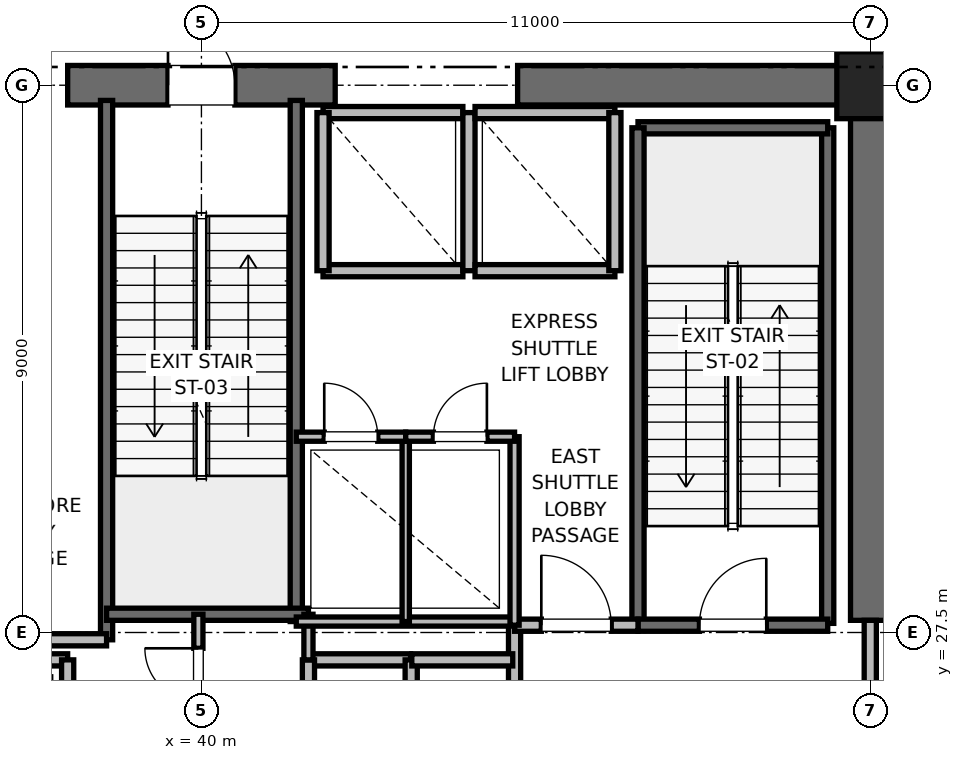
"""IFC4 building model, lengths in metres.
Left out: names, types, materials, properties, quantities, classifications, styles, units other than length and angle.
Written with IfcOpenShell. Run it as: python <this file> out.ifc"""

import sys

from ifc_helpers import new_model, si_unit, direction, frame, frame_2d, origin, origin_2d, place, context, subcontext, project, spatial, rectangle, extrude, element, fill, save


model = new_model("IFC4")
c1 = context("Model", 3, precision=1e-05, world=origin(), true_north=direction((0.0, 1.0)))
c2 = subcontext(c1, "Body", "Model", "MODEL_VIEW")
j1 = project(units=[si_unit("LENGTHUNIT", "METRE"), si_unit("PLANEANGLEUNIT", "RADIAN")], contexts=[c1])
p1 = place(None, origin())
s1 = spatial("IfcSite", under=j1, at=p1, CompositionType="ELEMENT")
p2 = place(p1, origin())
s2 = spatial("IfcBuilding", under=s1, at=p2, CompositionType="ELEMENT")
p3 = place(p2, frame((0.0, 0.0, 113.0)))
s3 = spatial("IfcBuildingStorey", under=s2, at=p3, CompositionType="ELEMENT", Elevation=113.0)
p4 = place(p3, frame((51.0, 36.5, 0.0), z_axis=(0.0, 0.0, 1.0), x_axis=(1.0, 0.0, 0.0)))
e1 = element("IfcColumn", 1, at=p4, inside=s3, PredefinedType="PILASTER", context=c2, shape_type="SweptSolid", body=[
    extrude(rectangle(XDim=1.1, YDim=1.1, at=origin_2d()), origin(), (0.0, 0.0, 1.0), 5.4),
])
p5 = place(p3, frame((37.8, 36.5, 0.0), z_axis=(0.0, 0.0, 1.0), x_axis=(1.0, 0.0, 0.0)))
e2 = element("IfcWall", 2, at=p5, inside=s3, PredefinedType="SHEAR", context=c2, shape_type="SweptSolid", body=[
    extrude(rectangle(XDim=4.4, YDim=0.65, at=frame_2d((2.2, 0.0))), origin(), (0.0, 0.0, 1.0), 5.1),
])
p6 = place(p5, frame((1.65, 0.0, 0.0)))
e3 = element("IfcOpeningElement", 3, at=p6, cuts=e2, PredefinedType="OPENING", context=c2, shape_type="SweptSolid", body=[
    extrude(rectangle(XDim=1.1, YDim=2.15, at=frame_2d((0.55, 1.075))), frame((0.0, 0.325, 0.0), z_axis=(0.0, -1.0, 0.0), x_axis=(1.0, 0.0, 0.0)), (0.0, 0.0, 1.0), 0.65),
])
p7 = place(p3, frame((45.2, 36.5, 0.0), z_axis=(0.0, 0.0, 1.0), x_axis=(1.0, 0.0, 0.0)))
e4 = element("IfcWall", 4, at=p7, inside=s3, PredefinedType="SHEAR", context=c2, shape_type="SweptSolid", body=[
    extrude(rectangle(XDim=5.8, YDim=0.65, at=frame_2d((2.9, 0.0))), origin(), (0.0, 0.0, 1.0), 5.1),
])
p8 = place(p3, frame((51.0, 27.7, 0.0), z_axis=(0.0, 0.0, 1.0), x_axis=(0.0, 1.0, 0.0)))
e5 = element("IfcWall", 5, at=p8, inside=s3, PredefinedType="SHEAR", context=c2, shape_type="SweptSolid", body=[
    extrude(rectangle(XDim=8.8, YDim=0.65, at=frame_2d((4.4, 0.0))), origin(), (0.0, 0.0, 1.0), 5.1),
])
p9 = place(p3, frame((50.3, 27.65, 0.0), z_axis=(0.0, 0.0, 1.0), x_axis=(0.0, 1.0, 0.0)))
e6 = element("IfcWall", 6, at=p9, inside=s3, PredefinedType="SOLIDWALL", context=c2, shape_type="SweptSolid", body=[
    extrude(rectangle(XDim=8.15, YDim=0.2, at=frame_2d((4.075, 0.0))), origin(), (0.0, 0.0, 1.0), 5.1),
])
p10 = place(p3, frame((47.18, 35.8, 0.0), z_axis=(0.0, 0.0, 1.0), x_axis=(1.0, 0.0, 0.0)))
e7 = element("IfcWall", 7, at=p10, inside=s3, PredefinedType="SOLIDWALL", context=c2, shape_type="SweptSolid", body=[
    extrude(rectangle(XDim=3.12, YDim=0.2, at=frame_2d((1.56, 0.0))), origin(), (0.0, 0.0, 1.0), 5.1),
])
p11 = place(p3, frame((47.18, 27.62, 0.0), z_axis=(0.0, 0.0, 1.0), x_axis=(0.0, 1.0, 0.0)))
e8 = element("IfcWall", 8, at=p11, inside=s3, PredefinedType="SOLIDWALL", context=c2, shape_type="SweptSolid", body=[
    extrude(rectangle(XDim=8.18, YDim=0.2, at=frame_2d((4.09, 0.0))), origin(), (0.0, 0.0, 1.0), 5.1),
])
p12 = place(p3, frame((47.18, 27.62, 0.0), z_axis=(0.0, 0.0, 1.0), x_axis=(1.0, 0.0, 0.0)))
e9 = element("IfcWall", 9, at=p12, inside=s3, PredefinedType="SOLIDWALL", context=c2, shape_type="SweptSolid", body=[
    extrude(rectangle(XDim=3.12, YDim=0.2, at=frame_2d((1.56, 0.0))), origin(), (0.0, 0.0, 1.0), 5.1),
])
p13 = place(p12, frame((1.01, 0.0, 0.0)))
e10 = element("IfcOpeningElement", 10, at=p13, cuts=e9, PredefinedType="OPENING", context=c2, shape_type="SweptSolid", body=[
    extrude(rectangle(XDim=1.1, YDim=2.15, at=frame_2d((0.55, 1.075))), frame((0.0, 0.1, 0.0), z_axis=(0.0, -1.0, 0.0), x_axis=(1.0, 0.0, 0.0)), (0.0, 0.0, 1.0), 0.2),
])
p14 = place(p3, frame((38.44, 27.38, 0.0), z_axis=(0.0, 0.0, 1.0), x_axis=(0.0, 1.0, 0.0)))
e11 = element("IfcWall", 11, at=p14, inside=s3, PredefinedType="SOLIDWALL", context=c2, shape_type="SweptSolid", body=[
    extrude(rectangle(XDim=8.87, YDim=0.2, at=frame_2d((4.435, 0.0))), origin(), (0.0, 0.0, 1.0), 5.1),
])
p15 = place(p3, frame((41.56, 27.68, 0.0), z_axis=(0.0, 0.0, 1.0), x_axis=(0.0, 1.0, 0.0)))
e12 = element("IfcWall", 12, at=p15, inside=s3, PredefinedType="SOLIDWALL", context=c2, shape_type="SweptSolid", body=[
    extrude(rectangle(XDim=8.57, YDim=0.2, at=frame_2d((4.285, 0.0))), origin(), (0.0, 0.0, 1.0), 5.1),
])
p16 = place(p3, frame((38.44, 27.8, 0.0), z_axis=(0.0, 0.0, 1.0), x_axis=(1.0, 0.0, 0.0)))
e13 = element("IfcWall", 13, at=p16, inside=s3, PredefinedType="SOLIDWALL", context=c2, shape_type="SweptSolid", body=[
    extrude(rectangle(XDim=3.32, YDim=0.2, at=frame_2d((1.66, 0.0))), origin(), (0.0, 0.0, 1.0), 5.1),
])
p17 = place(p3, frame((32.82, 27.38, 0.0), z_axis=(0.0, 0.0, 1.0), x_axis=(1.0, 0.0, 0.0)))
e14 = element("IfcWall", 14, at=p17, inside=s3, PredefinedType="PARTITIONING", context=c2, shape_type="SweptSolid", body=[
    extrude(rectangle(XDim=5.62, YDim=0.2, at=frame_2d((2.81, 0.0))), origin(), (0.0, 0.0, 1.0), 5.1),
])
p18 = place(p3, frame((45.15, 24.25, 0.0), z_axis=(0.0, 0.0, 1.0), x_axis=(0.0, 1.0, 0.0)))
e15 = element("IfcWall", 15, at=p18, inside=s3, PredefinedType="PARTITIONING", context=c2, shape_type="SweptSolid", body=[
    extrude(rectangle(XDim=3.37, YDim=0.2, at=frame_2d((1.685, 0.0))), origin(), (0.0, 0.0, 1.0), 5.1),
])
p19 = place(p3, frame((45.15, 27.62, 0.0), z_axis=(0.0, 0.0, 1.0), x_axis=(1.0, 0.0, 0.0)))
e16 = element("IfcWall", 16, at=p19, inside=s3, PredefinedType="PARTITIONING", context=c2, shape_type="SweptSolid", body=[
    extrude(rectangle(XDim=2.03, YDim=0.2, at=frame_2d((1.015, 0.0))), origin(), (0.0, 0.0, 1.0), 5.1),
])
p20 = place(p19, frame((0.44, 0.0, 0.0)))
e17 = element("IfcOpeningElement", 17, at=p20, cuts=e16, PredefinedType="OPENING", context=c2, shape_type="SweptSolid", body=[
    extrude(rectangle(XDim=1.15, YDim=2.2, at=frame_2d((0.575, 1.1))), frame((0.0, 0.1, 0.0), z_axis=(0.0, -1.0, 0.0), x_axis=(1.0, 0.0, 0.0)), (0.0, 0.0, 1.0), 0.2),
])
p21 = place(p3, frame((51.0, 24.3, 0.0), z_axis=(0.0, 0.0, 1.0), x_axis=(0.0, 1.0, 0.0)))
e18 = element("IfcWall", 18, at=p21, inside=s3, PredefinedType="PARTITIONING", context=c2, shape_type="SweptSolid", body=[
    extrude(rectangle(XDim=3.4, YDim=0.2, at=frame_2d((1.7, 0.0))), origin(), (0.0, 0.0, 1.0), 3.88),
])
p22 = place(p21, frame((1.125, 0.0, 0.0)))
e19 = element("IfcOpeningElement", 19, at=p22, cuts=e18, PredefinedType="OPENING", context=c2, shape_type="SweptSolid", body=[
    extrude(rectangle(XDim=1.15, YDim=2.2, at=frame_2d((0.575, 1.1))), frame((0.0, 0.1, 0.0), z_axis=(0.0, -1.0, 0.0), x_axis=(1.0, 0.0, 0.0)), (0.0, 0.0, 1.0), 0.2),
])
p23 = place(p3, frame((37.8, 27.05, 0.0), z_axis=(0.0, 0.0, 1.0), x_axis=(-1.0, 0.0, 0.0)))
e20 = element("IfcWall", 20, at=p23, inside=s3, PredefinedType="SOLIDWALL", context=c2, shape_type="SweptSolid", body=[
    extrude(rectangle(XDim=2.3, YDim=0.2, at=frame_2d((1.15, 0.0))), origin(), (0.0, 0.0, 1.0), 5.1),
])
p24 = place(p3, frame((37.8, 24.45, 0.0), z_axis=(0.0, 0.0, 1.0), x_axis=(0.0, 1.0, 0.0)))
e21 = element("IfcWall", 21, at=p24, inside=s3, PredefinedType="SOLIDWALL", context=c2, shape_type="SweptSolid", body=[
    extrude(rectangle(XDim=2.6, YDim=0.2, at=frame_2d((1.3, 0.0))), origin(), (0.0, 0.0, 1.0), 5.1),
])
p25 = place(p3, frame((43.44, 27.05, 0.0), z_axis=(0.0, 0.0, 1.0), x_axis=(-1.0, 0.0, 0.0)))
e22 = element("IfcWall", 22, at=p25, inside=s3, PredefinedType="SOLIDWALL", context=c2, shape_type="SweptSolid", body=[
    extrude(rectangle(XDim=1.68, YDim=0.2, at=frame_2d((0.84, 0.0))), origin(), (0.0, 0.0, 1.0), 5.1),
])
for number, where, z_axis, x_axis in (
    (23, (41.76, 27.05, 0.0), (0.0, 0.0, 1.0), (0.0, -1.0, 0.0)),
    (24, (43.45, 24.45, 0.0), (0.0, 0.0, 1.0), (0.0, 1.0, 0.0)),
):
    element("IfcWall", number, at=place(p3, frame(where, z_axis=z_axis, x_axis=x_axis)), inside=s3, PredefinedType="SOLIDWALL", context=c2, shape_type="SweptSolid", body=[
        extrude(rectangle(XDim=2.6, YDim=0.2, at=frame_2d((1.3, 0.0))), origin(), (0.0, 0.0, 1.0), 5.1),
    ])
p26 = place(p3, frame((45.12, 27.05, 0.0), z_axis=(0.0, 0.0, 1.0), x_axis=(-1.0, 0.0, 0.0)))
e25 = element("IfcWall", 25, at=p26, inside=s3, PredefinedType="SOLIDWALL", context=c2, shape_type="SweptSolid", body=[
    extrude(rectangle(XDim=1.66, YDim=0.2, at=frame_2d((0.83, 0.0))), origin(), (0.0, 0.0, 1.0), 5.1),
])
p27 = place(p3, frame((42.0, 33.45, 0.0), z_axis=(0.0, 0.0, 1.0), x_axis=(1.0, 0.0, 0.0)))
e26 = element("IfcWall", 26, at=p27, inside=s3, PredefinedType="SOLIDWALL", context=c2, shape_type="SweptSolid", body=[
    extrude(rectangle(XDim=2.3, YDim=0.2, at=frame_2d((1.15, 0.0))), origin(), (0.0, 0.0, 1.0), 5.1),
])
p28 = place(p3, frame((44.3, 36.05, 0.0), z_axis=(0.0, 0.0, 1.0), x_axis=(-1.0, 0.0, 0.0)))
e27 = element("IfcWall", 27, at=p28, inside=s3, PredefinedType="SOLIDWALL", context=c2, shape_type="SweptSolid", body=[
    extrude(rectangle(XDim=2.3, YDim=0.2, at=frame_2d((1.15, 0.0))), origin(), (0.0, 0.0, 1.0), 3.88),
])
for number, where, z_axis, x_axis in (
    (28, (42.0, 36.05, 0.0), (0.0, 0.0, 1.0), (0.0, -1.0, 0.0)),
    (29, (44.4, 33.45, 0.0), (0.0, 0.0, 1.0), (0.0, 1.0, 0.0)),
):
    element("IfcWall", number, at=place(p3, frame(where, z_axis=z_axis, x_axis=x_axis)), inside=s3, PredefinedType="SOLIDWALL", context=c2, shape_type="SweptSolid", body=[
        extrude(rectangle(XDim=2.6, YDim=0.2, at=frame_2d((1.3, 0.0))), origin(), (0.0, 0.0, 1.0), 3.88),
    ])
p29 = place(p3, frame((44.5, 33.45, 0.0), z_axis=(0.0, 0.0, 1.0), x_axis=(1.0, 0.0, 0.0)))
e30 = element("IfcWall", 30, at=p29, inside=s3, PredefinedType="SOLIDWALL", context=c2, shape_type="SweptSolid", body=[
    extrude(rectangle(XDim=2.3, YDim=0.2, at=frame_2d((1.15, 0.0))), origin(), (0.0, 0.0, 1.0), 5.1),
])
p30 = place(p3, frame((46.8, 36.05, 0.0), z_axis=(0.0, 0.0, 1.0), x_axis=(-1.0, 0.0, 0.0)))
e31 = element("IfcWall", 31, at=p30, inside=s3, PredefinedType="SOLIDWALL", context=c2, shape_type="SweptSolid", body=[
    extrude(rectangle(XDim=2.3, YDim=0.2, at=frame_2d((1.15, 0.0))), origin(), (0.0, 0.0, 1.0), 3.88),
])
p31 = place(p3, frame((46.8, 33.45, 0.0), z_axis=(0.0, 0.0, 1.0), x_axis=(0.0, 1.0, 0.0)))
e32 = element("IfcWall", 32, at=p31, inside=s3, PredefinedType="SOLIDWALL", context=c2, shape_type="SweptSolid", body=[
    extrude(rectangle(XDim=2.6, YDim=0.2, at=frame_2d((1.3, 0.0))), origin(), (0.0, 0.0, 1.0), 5.1),
])
p32 = place(p3, frame((41.76, 27.05, 0.0), z_axis=(0.0, 0.0, 1.0), x_axis=(0.0, 1.0, 0.0)))
e33 = element("IfcWall", 33, at=p32, inside=s3, PredefinedType="PARTITIONING", context=c2, shape_type="SweptSolid", body=[
    extrude(rectangle(XDim=0.75, YDim=0.15, at=frame_2d((0.375, 0.0))), origin(), (0.0, 0.0, 1.0), 2.85),
])
p33 = place(p3, frame((39.95, 25.8, 0.0), z_axis=(0.0, 0.0, 1.0), x_axis=(0.0, 1.0, 0.0)))
e34 = element("IfcWall", 34, at=p33, inside=s3, PredefinedType="PARTITIONING", context=c2, shape_type="SweptSolid", body=[
    extrude(rectangle(XDim=2.0, YDim=0.15, at=frame_2d((1.0, 0.0))), origin(), (0.0, 0.0, 1.0), 2.85),
])
p34 = place(p33, frame((0.56, 0.0, 0.0)))
e35 = element("IfcOpeningElement", 35, at=p34, cuts=e34, PredefinedType="OPENING", context=c2, shape_type="SweptSolid", body=[
    extrude(rectangle(XDim=0.88, YDim=2.1, at=frame_2d((0.44, 1.05))), frame((0.0, 0.075, 0.0), z_axis=(0.0, -1.0, 0.0), x_axis=(1.0, 0.0, 0.0)), (0.0, 0.0, 1.0), 0.15),
])
p35 = place(p3, frame((41.56, 27.68, 0.0), z_axis=(0.0, 0.0, 1.0), x_axis=(1.0, 0.0, 0.0)))
e36 = element("IfcWall", 36, at=p35, inside=s3, PredefinedType="PARTITIONING", context=c2, shape_type="SweptSolid", body=[
    extrude(rectangle(XDim=3.59, YDim=0.15, at=frame_2d((1.795, 0.0))), origin(), (0.0, 0.0, 1.0), 2.85),
])
p36 = place(p3, frame((45.15, 27.62, 0.0), z_axis=(0.0, 0.0, 1.0), x_axis=(0.0, 1.0, 0.0)))
e37 = element("IfcWall", 37, at=p36, inside=s3, PredefinedType="PARTITIONING", context=c2, shape_type="SweptSolid", body=[
    extrude(rectangle(XDim=3.1, YDim=0.15, at=frame_2d((1.55, 0.0))), origin(), (0.0, 0.0, 1.0), 2.85),
])
p37 = place(p3, frame((43.36, 27.68, 0.0), z_axis=(0.0, 0.0, 1.0), x_axis=(0.0, 1.0, 0.0)))
e38 = element("IfcWall", 38, at=p37, inside=s3, PredefinedType="PARTITIONING", context=c2, shape_type="SweptSolid", body=[
    extrude(rectangle(XDim=3.04, YDim=0.12, at=frame_2d((1.52, 0.0))), origin(), (0.0, 0.0, 1.0), 2.85),
])
p38 = place(p3, frame((41.56, 30.72, 0.0), z_axis=(0.0, 0.0, 1.0), x_axis=(1.0, 0.0, 0.0)))
e39 = element("IfcWall", 39, at=p38, inside=s3, PredefinedType="PARTITIONING", context=c2, shape_type="SweptSolid", body=[
    extrude(rectangle(XDim=1.8, YDim=0.15, at=frame_2d((0.9, 0.0))), origin(), (0.0, 0.0, 1.0), 2.85),
])
p39 = place(p38, frame((0.46, 0.0, 0.0)))
e40 = element("IfcOpeningElement", 40, at=p39, cuts=e39, PredefinedType="OPENING", context=c2, shape_type="SweptSolid", body=[
    extrude(rectangle(XDim=0.88, YDim=2.1, at=frame_2d((0.44, 1.05))), frame((0.0, 0.075, 0.0), z_axis=(0.0, -1.0, 0.0), x_axis=(1.0, 0.0, 0.0)), (0.0, 0.0, 1.0), 0.15),
])
p40 = place(p3, frame((43.36, 30.72, 0.0), z_axis=(0.0, 0.0, 1.0), x_axis=(1.0, 0.0, 0.0)))
e41 = element("IfcWall", 41, at=p40, inside=s3, PredefinedType="PARTITIONING", context=c2, shape_type="SweptSolid", body=[
    extrude(rectangle(XDim=1.79, YDim=0.15, at=frame_2d((0.895, 0.0))), origin(), (0.0, 0.0, 1.0), 2.85),
])
p41 = place(p40, frame((0.455, 0.0, 0.0)))
e42 = element("IfcOpeningElement", 42, at=p41, cuts=e41, PredefinedType="OPENING", context=c2, shape_type="SweptSolid", body=[
    extrude(rectangle(XDim=0.88, YDim=2.1, at=frame_2d((0.44, 1.05))), frame((0.0, 0.075, 0.0), z_axis=(0.0, -1.0, 0.0), x_axis=(1.0, 0.0, 0.0)), (0.0, 0.0, 1.0), 0.15),
])
p42 = place(p13, origin())
e43 = element("IfcDoor", 43, at=p42, inside=s3, OperationType="SINGLE_SWING_RIGHT", PredefinedType="DOOR", context=c2, shape_type="SweptSolid", body=[
    extrude(rectangle(XDim=1.1, YDim=2.15, at=frame_2d((0.55, 1.075))), frame((0.0, 0.025, 0.0), z_axis=(0.0, -1.0, 0.0), x_axis=(1.0, 0.0, 0.0)), (0.0, 0.0, 1.0), 0.05),
])
fill(e10, e43)
p43 = place(p6, origin())
e44 = element("IfcDoor", 44, at=p43, inside=s3, OperationType="SINGLE_SWING_LEFT", PredefinedType="DOOR", context=c2, shape_type="SweptSolid", body=[
    extrude(rectangle(XDim=1.1, YDim=2.15, at=frame_2d((0.55, 1.075))), frame((0.0, 0.025, 0.0), z_axis=(0.0, -1.0, 0.0), x_axis=(1.0, 0.0, 0.0)), (0.0, 0.0, 1.0), 0.05),
])
fill(e3, e44)
p44 = place(p20, origin())
e45 = element("IfcDoor", 45, at=p44, inside=s3, OperationType="SINGLE_SWING_LEFT", PredefinedType="DOOR", context=c2, shape_type="SweptSolid", body=[
    extrude(rectangle(XDim=1.15, YDim=2.2, at=frame_2d((0.575, 1.1))), frame((0.0, 0.025, 0.0), z_axis=(0.0, -1.0, 0.0), x_axis=(1.0, 0.0, 0.0)), (0.0, 0.0, 1.0), 0.05),
])
fill(e17, e45)
p45 = place(p34, origin())
e46 = element("IfcDoor", 46, at=p45, inside=s3, OperationType="SINGLE_SWING_RIGHT", PredefinedType="DOOR", context=c2, shape_type="SweptSolid", body=[
    extrude(rectangle(XDim=0.88, YDim=2.1, at=frame_2d((0.44, 1.05))), frame((0.0, 0.025, 0.0), z_axis=(0.0, -1.0, 0.0), x_axis=(1.0, 0.0, 0.0)), (0.0, 0.0, 1.0), 0.05),
])
fill(e35, e46)
p46 = place(p39, origin())
e47 = element("IfcDoor", 47, at=p46, inside=s3, OperationType="SINGLE_SWING_LEFT", PredefinedType="DOOR", context=c2, shape_type="SweptSolid", body=[
    extrude(rectangle(XDim=0.88, YDim=2.1, at=frame_2d((0.44, 1.05))), frame((0.0, 0.025, 0.0), z_axis=(0.0, -1.0, 0.0), x_axis=(1.0, 0.0, 0.0)), (0.0, 0.0, 1.0), 0.05),
])
fill(e40, e47)
p47 = place(p41, origin())
e48 = element("IfcDoor", 48, at=p47, inside=s3, OperationType="SINGLE_SWING_RIGHT", PredefinedType="DOOR", context=c2, shape_type="SweptSolid", body=[
    extrude(rectangle(XDim=0.88, YDim=2.1, at=frame_2d((0.44, 1.05))), frame((0.0, 0.025, 0.0), z_axis=(0.0, -1.0, 0.0), x_axis=(1.0, 0.0, 0.0)), (0.0, 0.0, 1.0), 0.05),
])
fill(e42, e48)
save(model, sys.argv[1])
